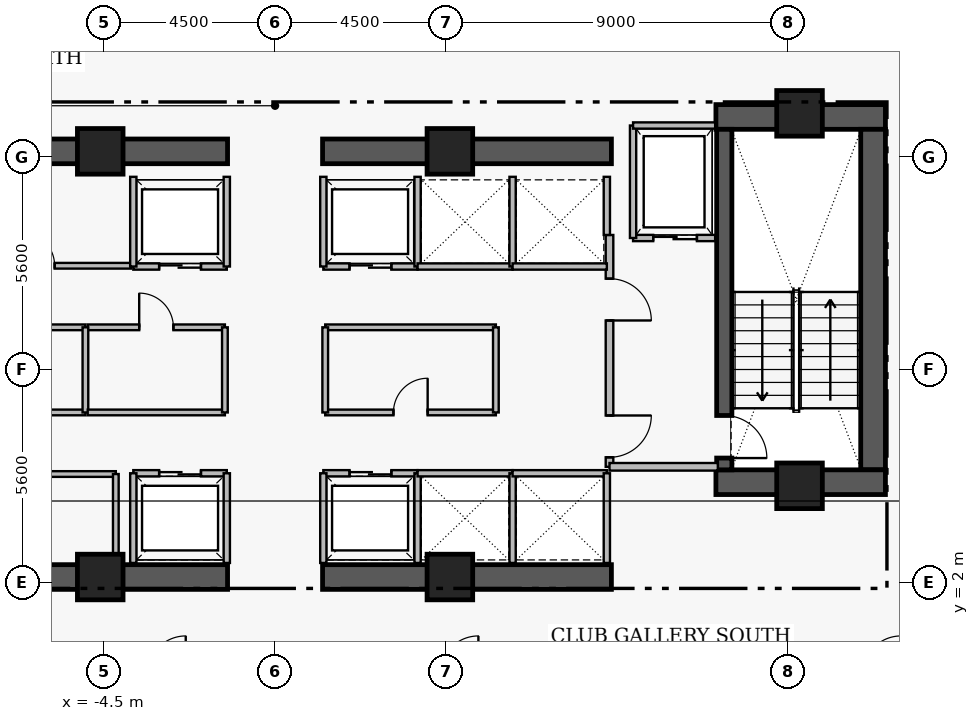
"""IFC4 building model, lengths in metres.
Left out: names, types, materials, properties, quantities, classifications, styles, units other than length and angle.
Written with IfcOpenShell. Run it as: python <this file> out.ifc"""

import sys

from ifc_helpers import new_model, si_unit, direction, frame, frame_2d, origin, origin_2d, place, context, subcontext, project, spatial, rectangle, extrude, element, fill, save


model = new_model("IFC4")
c1 = context("Model", 3, precision=1e-05, world=origin(), true_north=direction((0.0, 1.0)))
c2 = subcontext(c1, "Body", "Model", "MODEL_VIEW")
j1 = project(units=[si_unit("LENGTHUNIT", "METRE"), si_unit("PLANEANGLEUNIT", "RADIAN")], contexts=[c1])
p1 = place(None, origin())
s1 = spatial("IfcSite", under=j1, at=p1, CompositionType="ELEMENT")
p2 = place(p1, origin())
s2 = spatial("IfcBuilding", under=s1, at=p2, CompositionType="ELEMENT")
p3 = place(p2, frame((0.0, 0.0, 203.65)))
s3 = spatial("IfcBuildingStorey", under=s2, at=p3, CompositionType="ELEMENT", Elevation=203.65)
p4 = place(p3, frame((11.6, 14.255, 0.0), z_axis=(0.0, 0.0, 1.0), x_axis=(1.0, 0.0, 0.0)))
e1 = element("IfcWall", 1, at=p4, inside=s3, PredefinedType="SHEAR", context=c2, shape_type="SweptSolid", body=[
    extrude(rectangle(XDim=4.46, YDim=0.65, at=frame_2d((2.23, 0.0))), origin(), (0.0, 0.0, 1.0), 3.56),
])
p5 = place(p3, frame((15.735, 4.97, 0.0), z_axis=(0.0, 0.0, 1.0), x_axis=(0.0, 1.0, 0.0)))
e2 = element("IfcWall", 2, at=p5, inside=s3, PredefinedType="SHEAR", context=c2, shape_type="SweptSolid", body=[
    extrude(rectangle(XDim=8.96, YDim=0.65, at=frame_2d((4.48, 0.0))), origin(), (0.0, 0.0, 1.0), 3.56),
])
p6 = place(p3, frame((11.6, 4.645, 0.0), z_axis=(0.0, 0.0, 1.0), x_axis=(1.0, 0.0, 0.0)))
e3 = element("IfcWall", 3, at=p6, inside=s3, PredefinedType="SHEAR", context=c2, shape_type="SweptSolid", body=[
    extrude(rectangle(XDim=4.46, YDim=0.65, at=frame_2d((2.23, 0.0))), origin(), (0.0, 0.0, 1.0), 3.56),
])
for number, where, z_axis, x_axis in (
    (4, (-8.85, 2.15, 0.0), (0.0, 0.0, 1.0), (1.0, 0.0, 0.0)),
    (5, (1.25, 2.15, 0.0), (0.0, 0.0, 1.0), (1.0, 0.0, 0.0)),
    (6, (-8.85, 13.35, 0.0), (0.0, 0.0, 1.0), (1.0, 0.0, 0.0)),
    (7, (1.25, 13.35, 0.0), (0.0, 0.0, 1.0), (1.0, 0.0, 0.0)),
):
    element("IfcWall", number, at=place(p3, frame(where, z_axis=z_axis, x_axis=x_axis)), inside=s3, PredefinedType="SHEAR", context=c2, shape_type="SweptSolid", body=[
        extrude(rectangle(XDim=7.6, YDim=0.65, at=frame_2d((3.8, 0.0))), origin(), (0.0, 0.0, 1.0), 3.53),
    ])
p7 = place(p3, frame((11.82, 13.93, 0.0), z_axis=(0.0, 0.0, 1.0), x_axis=(0.0, -1.0, 0.0)))
e8 = element("IfcWall", 8, at=p7, inside=s3, PredefinedType="SHEAR", context=c2, shape_type="SweptSolid", body=[
    extrude(rectangle(XDim=8.96, YDim=0.4, at=frame_2d((4.48, 0.0))), origin(), (0.0, 0.0, 1.0), 3.56),
])
p8 = place(p7, frame((7.53, 0.0, 0.0)))
e9 = element("IfcOpeningElement", 9, at=p8, cuts=e8, PredefinedType="OPENING", context=c2, shape_type="SweptSolid", body=[
    extrude(rectangle(XDim=1.12, YDim=2.22, at=frame_2d((0.56, 1.11))), frame((0.0, 0.21, 0.0), z_axis=(0.0, -1.0, 0.0), x_axis=(1.0, 0.0, 0.0)), (0.0, 0.0, 1.0), 0.42),
])
for number, where, z_axis, x_axis in (
    (10, (-4.6, 13.35, 0.0), (0.0, 0.0, 1.0), (1.0, 0.0, 0.0)),
    (11, (4.6, 13.35, 0.0), (0.0, 0.0, 1.0), (1.0, 0.0, 0.0)),
    (12, (13.8, 14.35, 0.0), (0.0, 0.0, 1.0), (1.0, 0.0, 0.0)),
    (13, (-4.6, 2.15, 0.0), (0.0, 0.0, 1.0), (1.0, 0.0, 0.0)),
    (14, (4.6, 2.15, 0.0), (0.0, 0.0, 1.0), (1.0, 0.0, 0.0)),
    (15, (13.8, 4.55, 0.0), (0.0, 0.0, 1.0), (1.0, 0.0, 0.0)),
):
    element("IfcColumn", number, at=place(p3, frame(where, z_axis=z_axis, x_axis=x_axis)), inside=s3, PredefinedType="COLUMN", context=c2, shape_type="SweptSolid", body=[
        extrude(rectangle(XDim=1.2, YDim=1.2, at=origin_2d()), origin(), (0.0, 0.0, 1.0), 3.75),
    ])
p9 = place(p3, frame((8.8, 11.15, 0.0), z_axis=(0.0, 0.0, 1.0), x_axis=(0.0, -1.0, 0.0)))
e16 = element("IfcWall", 16, at=p9, inside=s3, PredefinedType="PARTITIONING", context=c2, shape_type="SweptSolid", body=[
    extrude(rectangle(XDim=6.1, YDim=0.2, at=frame_2d((3.05, 0.0))), origin(), (0.0, 0.0, 1.0), 3.53),
])
p10 = place(p9, frame((1.15, 0.0, 0.0)))
e17 = element("IfcOpeningElement", 17, at=p10, cuts=e16, PredefinedType="OPENING", context=c2, shape_type="SweptSolid", body=[
    extrude(rectangle(XDim=1.1, YDim=2.2, at=frame_2d((0.55, 1.1))), frame((0.0, 0.11, 0.0), z_axis=(0.0, -1.0, 0.0), x_axis=(1.0, 0.0, 0.0)), (0.0, 0.0, 1.0), 0.22),
])
p11 = place(p9, frame((4.75, 0.0, 0.0)))
e18 = element("IfcOpeningElement", 18, at=p11, cuts=e16, PredefinedType="OPENING", context=c2, shape_type="SweptSolid", body=[
    extrude(rectangle(XDim=1.1, YDim=2.2, at=frame_2d((0.55, 1.1))), frame((0.0, 0.11, 0.0), z_axis=(0.0, -1.0, 0.0), x_axis=(1.0, 0.0, 0.0)), (0.0, 0.0, 1.0), 0.22),
])
p12 = place(p3, frame((9.42, 11.07, 0.0), z_axis=(0.0, 0.0, 1.0), x_axis=(1.0, 0.0, 0.0)))
e19 = element("IfcWall", 19, at=p12, inside=s3, PredefinedType="PARTITIONING", context=c2, shape_type="SweptSolid", body=[
    extrude(rectangle(XDim=2.16, YDim=0.165, at=frame_2d((1.08, 0.0))), origin(), (0.0, 0.0, 1.0), 3.53),
])
p13 = place(p12, frame((0.53, 0.0, 0.0)))
e20 = element("IfcOpeningElement", 20, at=p13, cuts=e19, PredefinedType="OPENING", context=c2, shape_type="SweptSolid", body=[
    extrude(rectangle(XDim=1.15, YDim=2.25, at=frame_2d((0.575, 1.125))), frame((0.0, 0.093, 0.0), z_axis=(0.0, -1.0, 0.0), x_axis=(1.0, 0.0, 0.0)), (0.0, 0.0, 1.0), 0.185),
])
p14 = place(p3, frame((-3.73, 4.88, 0.0), z_axis=(0.0, 0.0, 1.0), x_axis=(1.0, 0.0, 0.0)))
e21 = element("IfcWall", 21, at=p14, inside=s3, PredefinedType="PARTITIONING", context=c2, shape_type="SweptSolid", body=[
    extrude(rectangle(XDim=2.46, YDim=0.165, at=frame_2d((1.23, 0.0))), origin(), (0.0, 0.0, 1.0), 3.53),
])
p15 = place(p14, frame((0.68, 0.0, 0.0)))
e22 = element("IfcOpeningElement", 22, at=p15, cuts=e21, PredefinedType="OPENING", context=c2, shape_type="SweptSolid", body=[
    extrude(rectangle(XDim=1.1, YDim=2.25, at=frame_2d((0.55, 1.125))), frame((0.0, 0.093, 0.0), z_axis=(0.0, -1.0, 0.0), x_axis=(1.0, 0.0, 0.0)), (0.0, 0.0, 1.0), 0.185),
])
p16 = place(p3, frame((1.27, 4.88, 0.0), z_axis=(0.0, 0.0, 1.0), x_axis=(1.0, 0.0, 0.0)))
e23 = element("IfcWall", 23, at=p16, inside=s3, PredefinedType="PARTITIONING", context=c2, shape_type="SweptSolid", body=[
    extrude(rectangle(XDim=2.48, YDim=0.165, at=frame_2d((1.24, 0.0))), origin(), (0.0, 0.0, 1.0), 3.53),
])
p17 = place(p16, frame((0.69, 0.0, 0.0)))
e24 = element("IfcOpeningElement", 24, at=p17, cuts=e23, PredefinedType="OPENING", context=c2, shape_type="SweptSolid", body=[
    extrude(rectangle(XDim=1.1, YDim=2.25, at=frame_2d((0.55, 1.125))), frame((0.0, 0.093, 0.0), z_axis=(0.0, -1.0, 0.0), x_axis=(1.0, 0.0, 0.0)), (0.0, 0.0, 1.0), 0.185),
])
p18 = place(p3, frame((-3.73, 10.32, 0.0), z_axis=(0.0, 0.0, 1.0), x_axis=(1.0, 0.0, 0.0)))
e25 = element("IfcWall", 25, at=p18, inside=s3, PredefinedType="PARTITIONING", context=c2, shape_type="SweptSolid", body=[
    extrude(rectangle(XDim=2.46, YDim=0.165, at=frame_2d((1.23, 0.0))), origin(), (0.0, 0.0, 1.0), 3.53),
])
p19 = place(p18, frame((0.68, 0.0, 0.0)))
e26 = element("IfcOpeningElement", 26, at=p19, cuts=e25, PredefinedType="OPENING", context=c2, shape_type="SweptSolid", body=[
    extrude(rectangle(XDim=1.1, YDim=2.25, at=frame_2d((0.55, 1.125))), frame((0.0, 0.093, 0.0), z_axis=(0.0, -1.0, 0.0), x_axis=(1.0, 0.0, 0.0)), (0.0, 0.0, 1.0), 0.185),
])
p20 = place(p3, frame((1.27, 10.32, 0.0), z_axis=(0.0, 0.0, 1.0), x_axis=(1.0, 0.0, 0.0)))
e27 = element("IfcWall", 27, at=p20, inside=s3, PredefinedType="PARTITIONING", context=c2, shape_type="SweptSolid", body=[
    extrude(rectangle(XDim=2.48, YDim=0.165, at=frame_2d((1.24, 0.0))), origin(), (0.0, 0.0, 1.0), 3.53),
])
p21 = place(p20, frame((0.69, 0.0, 0.0)))
e28 = element("IfcOpeningElement", 28, at=p21, cuts=e27, PredefinedType="OPENING", context=c2, shape_type="SweptSolid", body=[
    extrude(rectangle(XDim=1.1, YDim=2.25, at=frame_2d((0.55, 1.125))), frame((0.0, 0.093, 0.0), z_axis=(0.0, -1.0, 0.0), x_axis=(1.0, 0.0, 0.0)), (0.0, 0.0, 1.0), 0.185),
])
p22 = place(p3, frame((-8.71, 4.86, 0.0), z_axis=(0.0, 0.0, 1.0), x_axis=(1.0, 0.0, 0.0)))
e29 = element("IfcWall", 29, at=p22, inside=s3, PredefinedType="PARTITIONING", context=c2, shape_type="SweptSolid", body=[
    extrude(rectangle(XDim=4.52, YDim=0.15, at=frame_2d((2.26, 0.0))), origin(), (0.0, 0.0, 1.0), 3.53),
])
p23 = place(p22, frame((1.81, 0.0, 0.0)))
e30 = element("IfcOpeningElement", 30, at=p23, cuts=e29, PredefinedType="OPENING", context=c2, shape_type="SweptSolid", body=[
    extrude(rectangle(XDim=0.9, YDim=2.15, at=frame_2d((0.45, 1.075))), frame((0.0, 0.085, 0.0), z_axis=(0.0, -1.0, 0.0), x_axis=(1.0, 0.0, 0.0)), (0.0, 0.0, 1.0), 0.17),
])
p24 = place(p3, frame((-8.71, 10.34, 0.0), z_axis=(0.0, 0.0, 1.0), x_axis=(1.0, 0.0, 0.0)))
e31 = element("IfcWall", 31, at=p24, inside=s3, PredefinedType="PARTITIONING", context=c2, shape_type="SweptSolid", body=[
    extrude(rectangle(XDim=4.92, YDim=0.15, at=frame_2d((2.46, 0.0))), origin(), (0.0, 0.0, 1.0), 3.53),
])
p25 = place(p24, frame((2.01, 0.0, 0.0)))
e32 = element("IfcOpeningElement", 32, at=p25, cuts=e31, PredefinedType="OPENING", context=c2, shape_type="SweptSolid", body=[
    extrude(rectangle(XDim=0.9, YDim=2.15, at=frame_2d((0.45, 1.075))), frame((0.0, 0.085, 0.0), z_axis=(0.0, -1.0, 0.0), x_axis=(1.0, 0.0, 0.0)), (0.0, 0.0, 1.0), 0.17),
])
p26 = place(p3, frame((-8.61, 6.48, 0.0), z_axis=(0.0, 0.0, 1.0), x_axis=(1.0, 0.0, 0.0)))
e33 = element("IfcWall", 33, at=p26, inside=s3, PredefinedType="PARTITIONING", context=c2, shape_type="SweptSolid", body=[
    extrude(rectangle(XDim=3.62, YDim=0.15, at=frame_2d((1.81, 0.0))), origin(), (0.0, 0.0, 1.0), 3.53),
])
p27 = place(p26, frame((1.36, 0.0, 0.0)))
e34 = element("IfcOpeningElement", 34, at=p27, cuts=e33, PredefinedType="OPENING", context=c2, shape_type="SweptSolid", body=[
    extrude(rectangle(XDim=0.9, YDim=2.15, at=frame_2d((0.45, 1.075))), frame((0.0, 0.085, 0.0), z_axis=(0.0, -1.0, 0.0), x_axis=(1.0, 0.0, 0.0)), (0.0, 0.0, 1.0), 0.17),
])
p28 = place(p3, frame((-4.93, 8.72, 0.0), z_axis=(0.0, 0.0, 1.0), x_axis=(1.0, 0.0, 0.0)))
e35 = element("IfcWall", 35, at=p28, inside=s3, PredefinedType="PARTITIONING", context=c2, shape_type="SweptSolid", body=[
    extrude(rectangle(XDim=3.61, YDim=0.15, at=frame_2d((1.805, 0.0))), origin(), (0.0, 0.0, 1.0), 3.53),
])
p29 = place(p28, frame((1.355, 0.0, 0.0)))
e36 = element("IfcOpeningElement", 36, at=p29, cuts=e35, PredefinedType="OPENING", context=c2, shape_type="SweptSolid", body=[
    extrude(rectangle(XDim=0.9, YDim=2.15, at=frame_2d((0.45, 1.075))), frame((0.0, 0.085, 0.0), z_axis=(0.0, -1.0, 0.0), x_axis=(1.0, 0.0, 0.0)), (0.0, 0.0, 1.0), 0.17),
])
p30 = place(p3, frame((1.32, 6.48, 0.0), z_axis=(0.0, 0.0, 1.0), x_axis=(1.0, 0.0, 0.0)))
e37 = element("IfcWall", 37, at=p30, inside=s3, PredefinedType="PARTITIONING", context=c2, shape_type="SweptSolid", body=[
    extrude(rectangle(XDim=4.49, YDim=0.15, at=frame_2d((2.245, 0.0))), origin(), (0.0, 0.0, 1.0), 3.53),
])
p31 = place(p30, frame((1.795, 0.0, 0.0)))
e38 = element("IfcOpeningElement", 38, at=p31, cuts=e37, PredefinedType="OPENING", context=c2, shape_type="SweptSolid", body=[
    extrude(rectangle(XDim=0.9, YDim=2.15, at=frame_2d((0.45, 1.075))), frame((0.0, 0.085, 0.0), z_axis=(0.0, -1.0, 0.0), x_axis=(1.0, 0.0, 0.0)), (0.0, 0.0, 1.0), 0.17),
])
p32 = place(p3, frame((8.8, 5.05, 0.0), z_axis=(0.0, 0.0, 1.0), x_axis=(1.0, 0.0, 0.0)))
e39 = element("IfcWall", 39, at=p32, inside=s3, PredefinedType="PARTITIONING", context=c2, shape_type="SweptSolid", body=[
    extrude(rectangle(XDim=2.85, YDim=0.2, at=frame_2d((1.425, 0.0))), origin(), (0.0, 0.0, 1.0), 3.53),
])
p33 = place(p3, frame((9.42, 11.07, 0.0), z_axis=(0.0, 0.0, 1.0), x_axis=(0.0, 1.0, 0.0)))
e40 = element("IfcWall", 40, at=p33, inside=s3, PredefinedType="PARTITIONING", context=c2, shape_type="SweptSolid", body=[
    extrude(rectangle(XDim=2.96, YDim=0.165, at=frame_2d((1.48, 0.0))), origin(), (0.0, 0.0, 1.0), 3.53),
])
p34 = place(p3, frame((9.42, 14.03, 0.0), z_axis=(0.0, 0.0, 1.0), x_axis=(1.0, 0.0, 0.0)))
e41 = element("IfcWall", 41, at=p34, inside=s3, PredefinedType="PARTITIONING", context=c2, shape_type="SweptSolid", body=[
    extrude(rectangle(XDim=2.16, YDim=0.165, at=frame_2d((1.08, 0.0))), origin(), (0.0, 0.0, 1.0), 3.53),
])
for number, where, z_axis, x_axis in (
    (42, (-3.73, 2.52, 0.0), (0.0, 0.0, 1.0), (0.0, 1.0, 0.0)),
    (43, (-1.27, 2.52, 0.0), (0.0, 0.0, 1.0), (0.0, 1.0, 0.0)),
    (44, (1.27, 2.52, 0.0), (0.0, 0.0, 1.0), (0.0, 1.0, 0.0)),
    (45, (3.75, 2.52, 0.0), (0.0, 0.0, 1.0), (0.0, 1.0, 0.0)),
    (46, (-3.73, 10.32, 0.0), (0.0, 0.0, 1.0), (0.0, 1.0, 0.0)),
    (47, (-1.27, 10.32, 0.0), (0.0, 0.0, 1.0), (0.0, 1.0, 0.0)),
    (48, (1.27, 10.32, 0.0), (0.0, 0.0, 1.0), (0.0, 1.0, 0.0)),
    (49, (3.75, 10.32, 0.0), (0.0, 0.0, 1.0), (0.0, 1.0, 0.0)),
):
    element("IfcWall", number, at=place(p3, frame(where, z_axis=z_axis, x_axis=x_axis)), inside=s3, PredefinedType="PARTITIONING", context=c2, shape_type="SweptSolid", body=[
        extrude(rectangle(XDim=2.36, YDim=0.165, at=frame_2d((1.18, 0.0))), origin(), (0.0, 0.0, 1.0), 3.53),
    ])
p35 = place(p3, frame((3.75, 4.88, 0.0), z_axis=(0.0, 0.0, 1.0), x_axis=(1.0, 0.0, 0.0)))
e50 = element("IfcWall", 50, at=p35, inside=s3, PredefinedType="PARTITIONING", context=c2, shape_type="SweptSolid", body=[
    extrude(rectangle(XDim=2.5, YDim=0.165, at=frame_2d((1.25, 0.0))), origin(), (0.0, 0.0, 1.0), 3.53),
])
p36 = place(p3, frame((6.25, 2.52, 0.0), z_axis=(0.0, 0.0, 1.0), x_axis=(0.0, 1.0, 0.0)))
e51 = element("IfcWall", 51, at=p36, inside=s3, PredefinedType="PARTITIONING", context=c2, shape_type="SweptSolid", body=[
    extrude(rectangle(XDim=2.36, YDim=0.165, at=frame_2d((1.18, 0.0))), origin(), (0.0, 0.0, 1.0), 3.53),
])
p37 = place(p3, frame((6.25, 4.88, 0.0), z_axis=(0.0, 0.0, 1.0), x_axis=(1.0, 0.0, 0.0)))
e52 = element("IfcWall", 52, at=p37, inside=s3, PredefinedType="PARTITIONING", context=c2, shape_type="SweptSolid", body=[
    extrude(rectangle(XDim=2.48, YDim=0.165, at=frame_2d((1.24, 0.0))), origin(), (0.0, 0.0, 1.0), 3.53),
])
p38 = place(p3, frame((8.73, 2.52, 0.0), z_axis=(0.0, 0.0, 1.0), x_axis=(0.0, 1.0, 0.0)))
e53 = element("IfcWall", 53, at=p38, inside=s3, PredefinedType="PARTITIONING", context=c2, shape_type="SweptSolid", body=[
    extrude(rectangle(XDim=2.36, YDim=0.165, at=frame_2d((1.18, 0.0))), origin(), (0.0, 0.0, 1.0), 3.53),
])
p39 = place(p3, frame((3.75, 10.32, 0.0), z_axis=(0.0, 0.0, 1.0), x_axis=(1.0, 0.0, 0.0)))
e54 = element("IfcWall", 54, at=p39, inside=s3, PredefinedType="PARTITIONING", context=c2, shape_type="SweptSolid", body=[
    extrude(rectangle(XDim=2.5, YDim=0.165, at=frame_2d((1.25, 0.0))), origin(), (0.0, 0.0, 1.0), 3.53),
])
p40 = place(p3, frame((6.25, 10.32, 0.0), z_axis=(0.0, 0.0, 1.0), x_axis=(0.0, 1.0, 0.0)))
e55 = element("IfcWall", 55, at=p40, inside=s3, PredefinedType="PARTITIONING", context=c2, shape_type="SweptSolid", body=[
    extrude(rectangle(XDim=2.36, YDim=0.165, at=frame_2d((1.18, 0.0))), origin(), (0.0, 0.0, 1.0), 3.53),
])
p41 = place(p3, frame((6.25, 10.32, 0.0), z_axis=(0.0, 0.0, 1.0), x_axis=(1.0, 0.0, 0.0)))
e56 = element("IfcWall", 56, at=p41, inside=s3, PredefinedType="PARTITIONING", context=c2, shape_type="SweptSolid", body=[
    extrude(rectangle(XDim=2.48, YDim=0.165, at=frame_2d((1.24, 0.0))), origin(), (0.0, 0.0, 1.0), 3.53),
])
p42 = place(p3, frame((8.73, 11.15, 0.0), z_axis=(0.0, 0.0, 1.0), x_axis=(0.0, 1.0, 0.0)))
e57 = element("IfcWall", 57, at=p42, inside=s3, PredefinedType="PARTITIONING", context=c2, shape_type="SweptSolid", body=[
    extrude(rectangle(XDim=1.53, YDim=0.165, at=frame_2d((0.765, 0.0))), origin(), (0.0, 0.0, 1.0), 3.53),
])
p43 = place(p3, frame((-4.19, 2.49, 0.0), z_axis=(0.0, 0.0, 1.0), x_axis=(0.0, 1.0, 0.0)))
e58 = element("IfcWall", 58, at=p43, inside=s3, PredefinedType="PARTITIONING", context=c2, shape_type="SweptSolid", body=[
    extrude(rectangle(XDim=2.37, YDim=0.15, at=frame_2d((1.185, 0.0))), origin(), (0.0, 0.0, 1.0), 3.53),
])
p44 = place(p3, frame((-8.61, 8.72, 0.0), z_axis=(0.0, 0.0, 1.0), x_axis=(1.0, 0.0, 0.0)))
e59 = element("IfcWall", 59, at=p44, inside=s3, PredefinedType="PARTITIONING", context=c2, shape_type="SweptSolid", body=[
    extrude(rectangle(XDim=3.62, YDim=0.15, at=frame_2d((1.81, 0.0))), origin(), (0.0, 0.0, 1.0), 3.53),
])
p45 = place(p3, frame((-4.99, 6.48, 0.0), z_axis=(0.0, 0.0, 1.0), x_axis=(0.0, 1.0, 0.0)))
e60 = element("IfcWall", 60, at=p45, inside=s3, PredefinedType="PARTITIONING", context=c2, shape_type="SweptSolid", body=[
    extrude(rectangle(XDim=2.24, YDim=0.15, at=frame_2d((1.12, 0.0))), origin(), (0.0, 0.0, 1.0), 3.53),
])
p46 = place(p3, frame((-4.93, 6.48, 0.0), z_axis=(0.0, 0.0, 1.0), x_axis=(1.0, 0.0, 0.0)))
e61 = element("IfcWall", 61, at=p46, inside=s3, PredefinedType="PARTITIONING", context=c2, shape_type="SweptSolid", body=[
    extrude(rectangle(XDim=3.61, YDim=0.15, at=frame_2d((1.805, 0.0))), origin(), (0.0, 0.0, 1.0), 3.53),
])
p47 = place(p3, frame((-1.32, 6.48, 0.0), z_axis=(0.0, 0.0, 1.0), x_axis=(0.0, 1.0, 0.0)))
e62 = element("IfcWall", 62, at=p47, inside=s3, PredefinedType="PARTITIONING", context=c2, shape_type="SweptSolid", body=[
    extrude(rectangle(XDim=2.24, YDim=0.15, at=frame_2d((1.12, 0.0))), origin(), (0.0, 0.0, 1.0), 3.53),
])
p48 = place(p3, frame((1.32, 8.72, 0.0), z_axis=(0.0, 0.0, 1.0), x_axis=(1.0, 0.0, 0.0)))
e63 = element("IfcWall", 63, at=p48, inside=s3, PredefinedType="PARTITIONING", context=c2, shape_type="SweptSolid", body=[
    extrude(rectangle(XDim=4.49, YDim=0.15, at=frame_2d((2.245, 0.0))), origin(), (0.0, 0.0, 1.0), 3.53),
])
for number, where, z_axis, x_axis in (
    (64, (1.32, 6.48, 0.0), (0.0, 0.0, 1.0), (0.0, 1.0, 0.0)),
    (65, (5.81, 6.48, 0.0), (0.0, 0.0, 1.0), (0.0, 1.0, 0.0)),
):
    element("IfcWall", number, at=place(p3, frame(where, z_axis=z_axis, x_axis=x_axis)), inside=s3, PredefinedType="PARTITIONING", context=c2, shape_type="SweptSolid", body=[
        extrude(rectangle(XDim=2.24, YDim=0.15, at=frame_2d((1.12, 0.0))), origin(), (0.0, 0.0, 1.0), 3.53),
    ])
p49 = place(p8, origin())
e66 = element("IfcDoor", 66, at=p49, inside=s3, OperationType="SINGLE_SWING_RIGHT", PredefinedType="DOOR", context=c2, shape_type="SweptSolid", body=[
    extrude(rectangle(XDim=1.12, YDim=2.22, at=frame_2d((0.56, 1.11))), frame((0.0, 0.025, 0.0), z_axis=(0.0, -1.0, 0.0), x_axis=(1.0, 0.0, 0.0)), (0.0, 0.0, 1.0), 0.05),
])
fill(e9, e66)
p50 = place(p10, origin())
e67 = element("IfcDoor", 67, at=p50, inside=s3, OperationType="SINGLE_SWING_RIGHT", PredefinedType="DOOR", context=c2, shape_type="SweptSolid", body=[
    extrude(rectangle(XDim=1.1, YDim=2.2, at=frame_2d((0.55, 1.1))), frame((0.0, 0.025, 0.0), z_axis=(0.0, -1.0, 0.0), x_axis=(1.0, 0.0, 0.0)), (0.0, 0.0, 1.0), 0.05),
])
fill(e17, e67)
p51 = place(p11, origin())
e68 = element("IfcDoor", 68, at=p51, inside=s3, OperationType="SINGLE_SWING_LEFT", PredefinedType="DOOR", context=c2, shape_type="SweptSolid", body=[
    extrude(rectangle(XDim=1.1, YDim=2.2, at=frame_2d((0.55, 1.1))), frame((0.0, 0.025, 0.0), z_axis=(0.0, -1.0, 0.0), x_axis=(1.0, 0.0, 0.0)), (0.0, 0.0, 1.0), 0.05),
])
fill(e18, e68)
p52 = place(p13, origin())
e69 = element("IfcDoor", 69, at=p52, inside=s3, OperationType="SLIDING_TO_LEFT", PredefinedType="DOOR", context=c2, shape_type="SweptSolid", body=[
    extrude(rectangle(XDim=1.15, YDim=2.25, at=frame_2d((0.575, 1.125))), frame((0.0, 0.025, 0.0), z_axis=(0.0, -1.0, 0.0), x_axis=(1.0, 0.0, 0.0)), (0.0, 0.0, 1.0), 0.05),
])
fill(e20, e69)
p53 = place(p15, origin())
e70 = element("IfcDoor", 70, at=p53, inside=s3, OperationType="SLIDING_TO_LEFT", PredefinedType="DOOR", context=c2, shape_type="SweptSolid", body=[
    extrude(rectangle(XDim=1.1, YDim=2.25, at=frame_2d((0.55, 1.125))), frame((0.0, 0.025, 0.0), z_axis=(0.0, -1.0, 0.0), x_axis=(1.0, 0.0, 0.0)), (0.0, 0.0, 1.0), 0.05),
])
fill(e22, e70)
p54 = place(p17, origin())
e71 = element("IfcDoor", 71, at=p54, inside=s3, OperationType="SLIDING_TO_LEFT", PredefinedType="DOOR", context=c2, shape_type="SweptSolid", body=[
    extrude(rectangle(XDim=1.1, YDim=2.25, at=frame_2d((0.55, 1.125))), frame((0.0, 0.025, 0.0), z_axis=(0.0, -1.0, 0.0), x_axis=(1.0, 0.0, 0.0)), (0.0, 0.0, 1.0), 0.05),
])
fill(e24, e71)
p55 = place(p19, origin())
e72 = element("IfcDoor", 72, at=p55, inside=s3, OperationType="SLIDING_TO_LEFT", PredefinedType="DOOR", context=c2, shape_type="SweptSolid", body=[
    extrude(rectangle(XDim=1.1, YDim=2.25, at=frame_2d((0.55, 1.125))), frame((0.0, 0.025, 0.0), z_axis=(0.0, -1.0, 0.0), x_axis=(1.0, 0.0, 0.0)), (0.0, 0.0, 1.0), 0.05),
])
fill(e26, e72)
p56 = place(p21, origin())
e73 = element("IfcDoor", 73, at=p56, inside=s3, OperationType="SLIDING_TO_LEFT", PredefinedType="DOOR", context=c2, shape_type="SweptSolid", body=[
    extrude(rectangle(XDim=1.1, YDim=2.25, at=frame_2d((0.55, 1.125))), frame((0.0, 0.025, 0.0), z_axis=(0.0, -1.0, 0.0), x_axis=(1.0, 0.0, 0.0)), (0.0, 0.0, 1.0), 0.05),
])
fill(e28, e73)
p57 = place(p25, origin())
e74 = element("IfcDoor", 74, at=p57, inside=s3, OperationType="SINGLE_SWING_LEFT", PredefinedType="DOOR", context=c2, shape_type="SweptSolid", body=[
    extrude(rectangle(XDim=0.9, YDim=2.15, at=frame_2d((0.45, 1.075))), frame((0.0, 0.025, 0.0), z_axis=(0.0, -1.0, 0.0), x_axis=(1.0, 0.0, 0.0)), (0.0, 0.0, 1.0), 0.05),
])
fill(e32, e74)
p58 = place(p29, origin())
e75 = element("IfcDoor", 75, at=p58, inside=s3, OperationType="SINGLE_SWING_LEFT", PredefinedType="DOOR", context=c2, shape_type="SweptSolid", body=[
    extrude(rectangle(XDim=0.9, YDim=2.15, at=frame_2d((0.45, 1.075))), frame((0.0, 0.025, 0.0), z_axis=(0.0, -1.0, 0.0), x_axis=(1.0, 0.0, 0.0)), (0.0, 0.0, 1.0), 0.05),
])
fill(e36, e75)
p59 = place(p31, origin())
e76 = element("IfcDoor", 76, at=p59, inside=s3, OperationType="SINGLE_SWING_RIGHT", PredefinedType="DOOR", context=c2, shape_type="SweptSolid", body=[
    extrude(rectangle(XDim=0.9, YDim=2.15, at=frame_2d((0.45, 1.075))), frame((0.0, 0.025, 0.0), z_axis=(0.0, -1.0, 0.0), x_axis=(1.0, 0.0, 0.0)), (0.0, 0.0, 1.0), 0.05),
])
fill(e38, e76)
save(model, sys.argv[1])
